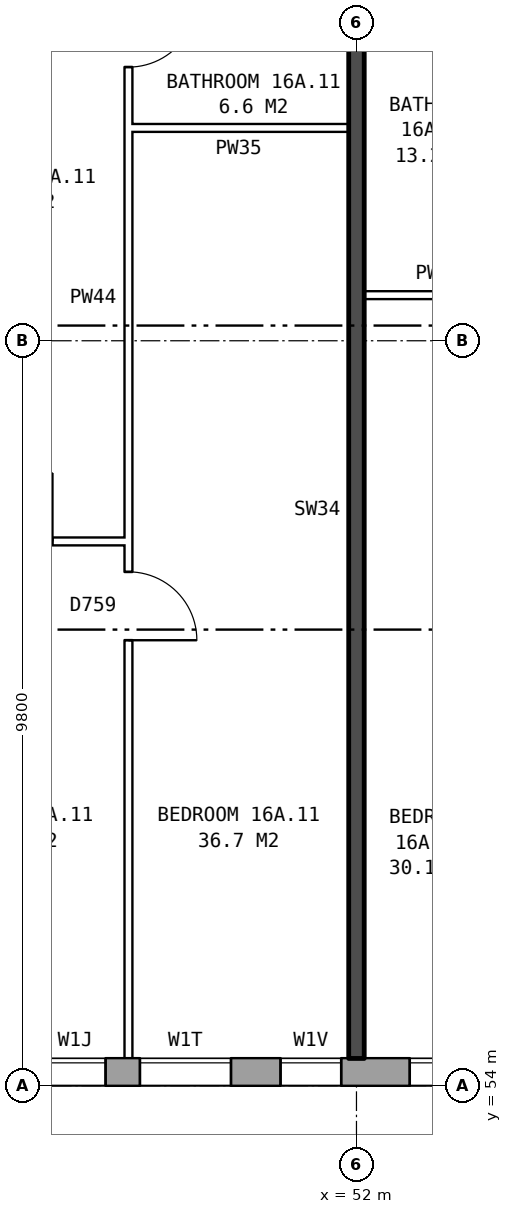
"""IFC4 building model, lengths in metres.
Left out: names, types, materials, properties, quantities, classifications, styles, units other than length and angle.
Written with IfcOpenShell. Run it as: python <this file> out.ifc"""

import sys

from ifc_helpers import new_model, si_unit, direction, frame, frame_2d, origin, place, context, subcontext, project, spatial, rectangle, extrude, element, fill, save


model = new_model("IFC4")
c1 = context("Model", 3, precision=1e-05, world=origin(), true_north=direction((0.0, 1.0)))
c2 = subcontext(c1, "Body", "Model", "MODEL_VIEW")
j1 = project(units=[si_unit("LENGTHUNIT", "METRE"), si_unit("PLANEANGLEUNIT", "RADIAN")], contexts=[c1])
p1 = place(None, origin())
s1 = spatial("IfcSite", under=j1, at=p1, CompositionType="ELEMENT")
p2 = place(p1, origin())
s2 = spatial("IfcBuilding", under=s1, at=p2, CompositionType="ELEMENT")
p3 = place(p2, frame((0.0, 0.0, 59.8)))
s3 = spatial("IfcBuildingStorey", under=s2, at=p3, CompositionType="ELEMENT", Elevation=59.8)
p4 = place(p3, frame((24.575, 54.18, 0.0), z_axis=(0.0, 0.0, 1.0), x_axis=(1.0, 0.0, 0.0)))
e1 = element("IfcWall", 1, at=p4, inside=s3, PredefinedType="STANDARD", context=c2, shape_type="SweptSolid", body=[
    extrude(rectangle(XDim=48.351, YDim=0.36, at=frame_2d((24.175, 0.0))), origin(), (0.0, 0.0, 1.0), 2.85),
])
p5 = place(p4, frame((1.125, 0.0, 0.8)))
e2 = element("IfcOpeningElement", 2, at=p5, cuts=e1, PredefinedType="OPENING", context=c2, shape_type="SweptSolid", body=[
    extrude(rectangle(XDim=1.6, YDim=1.8, at=frame_2d((0.8, 0.9))), frame((0.0, 0.19, 0.0), z_axis=(0.0, -1.0, 0.0), x_axis=(1.0, 0.0, 0.0)), (0.0, 0.0, 1.0), 0.38),
])
p6 = place(p4, frame((4.125, 0.0, 0.8)))
e3 = element("IfcOpeningElement", 3, at=p6, cuts=e1, PredefinedType="OPENING", context=c2, shape_type="SweptSolid", body=[
    extrude(rectangle(XDim=1.6, YDim=1.8, at=frame_2d((0.8, 0.9))), frame((0.0, 0.19, 0.0), z_axis=(0.0, -1.0, 0.0), x_axis=(1.0, 0.0, 0.0)), (0.0, 0.0, 1.0), 0.38),
])
p7 = place(p4, frame((7.125, 0.0, 0.8)))
e4 = element("IfcOpeningElement", 4, at=p7, cuts=e1, PredefinedType="OPENING", context=c2, shape_type="SweptSolid", body=[
    extrude(rectangle(XDim=1.6, YDim=1.8, at=frame_2d((0.8, 0.9))), frame((0.0, 0.19, 0.0), z_axis=(0.0, -1.0, 0.0), x_axis=(1.0, 0.0, 0.0)), (0.0, 0.0, 1.0), 0.38),
])
p8 = place(p4, frame((10.125, 0.0, 0.8)))
e5 = element("IfcOpeningElement", 5, at=p8, cuts=e1, PredefinedType="OPENING", context=c2, shape_type="SweptSolid", body=[
    extrude(rectangle(XDim=1.6, YDim=1.8, at=frame_2d((0.8, 0.9))), frame((0.0, 0.19, 0.0), z_axis=(0.0, -1.0, 0.0), x_axis=(1.0, 0.0, 0.0)), (0.0, 0.0, 1.0), 0.38),
])
p9 = place(p4, frame((13.125, 0.0, 0.8)))
e6 = element("IfcOpeningElement", 6, at=p9, cuts=e1, PredefinedType="OPENING", context=c2, shape_type="SweptSolid", body=[
    extrude(rectangle(XDim=1.6, YDim=1.8, at=frame_2d((0.8, 0.9))), frame((0.0, 0.19, 0.0), z_axis=(0.0, -1.0, 0.0), x_axis=(1.0, 0.0, 0.0)), (0.0, 0.0, 1.0), 0.38),
])
p10 = place(p4, frame((16.125, 0.0, 0.8)))
e7 = element("IfcOpeningElement", 7, at=p10, cuts=e1, PredefinedType="OPENING", context=c2, shape_type="SweptSolid", body=[
    extrude(rectangle(XDim=1.6, YDim=1.8, at=frame_2d((0.8, 0.9))), frame((0.0, 0.19, 0.0), z_axis=(0.0, -1.0, 0.0), x_axis=(1.0, 0.0, 0.0)), (0.0, 0.0, 1.0), 0.38),
])
p11 = place(p4, frame((19.125, 0.0, 0.8)))
e8 = element("IfcOpeningElement", 8, at=p11, cuts=e1, PredefinedType="OPENING", context=c2, shape_type="SweptSolid", body=[
    extrude(rectangle(XDim=1.6, YDim=1.8, at=frame_2d((0.8, 0.9))), frame((0.0, 0.19, 0.0), z_axis=(0.0, -1.0, 0.0), x_axis=(1.0, 0.0, 0.0)), (0.0, 0.0, 1.0), 0.38),
])
p12 = place(p4, frame((22.425, 0.0, 0.15)))
e9 = element("IfcOpeningElement", 9, at=p12, cuts=e1, PredefinedType="OPENING", context=c2, shape_type="SweptSolid", body=[
    extrude(rectangle(XDim=0.6, YDim=0.9, at=frame_2d((0.3, 0.45))), frame((0.0, 0.19, 0.0), z_axis=(0.0, -1.0, 0.0), x_axis=(1.0, 0.0, 0.0)), (0.0, 0.0, 1.0), 0.38),
])
p13 = place(p4, frame((24.575, 0.0, 0.25)))
e10 = element("IfcOpeningElement", 10, at=p13, cuts=e1, PredefinedType="OPENING", context=c2, shape_type="SweptSolid", body=[
    extrude(rectangle(XDim=1.2, YDim=0.9, at=frame_2d((0.6, 0.45))), frame((0.0, 0.19, 0.0), z_axis=(0.0, -1.0, 0.0), x_axis=(1.0, 0.0, 0.0)), (0.0, 0.0, 1.0), 0.38),
])
p14 = place(p4, frame((28.125, 0.0, 0.8)))
e11 = element("IfcOpeningElement", 11, at=p14, cuts=e1, PredefinedType="OPENING", context=c2, shape_type="SweptSolid", body=[
    extrude(rectangle(XDim=1.6, YDim=1.8, at=frame_2d((0.8, 0.9))), frame((0.0, 0.19, 0.0), z_axis=(0.0, -1.0, 0.0), x_axis=(1.0, 0.0, 0.0)), (0.0, 0.0, 1.0), 0.38),
])
p15 = place(p4, frame((31.125, 0.0, 0.8)))
e12 = element("IfcOpeningElement", 12, at=p15, cuts=e1, PredefinedType="OPENING", context=c2, shape_type="SweptSolid", body=[
    extrude(rectangle(XDim=1.6, YDim=1.8, at=frame_2d((0.8, 0.9))), frame((0.0, 0.19, 0.0), z_axis=(0.0, -1.0, 0.0), x_axis=(1.0, 0.0, 0.0)), (0.0, 0.0, 1.0), 0.38),
])
p16 = place(p4, frame((34.125, 0.0, 0.8)))
e13 = element("IfcOpeningElement", 13, at=p16, cuts=e1, PredefinedType="OPENING", context=c2, shape_type="SweptSolid", body=[
    extrude(rectangle(XDim=1.6, YDim=1.8, at=frame_2d((0.8, 0.9))), frame((0.0, 0.19, 0.0), z_axis=(0.0, -1.0, 0.0), x_axis=(1.0, 0.0, 0.0)), (0.0, 0.0, 1.0), 0.38),
])
p17 = place(p4, frame((37.125, 0.0, 0.8)))
e14 = element("IfcOpeningElement", 14, at=p17, cuts=e1, PredefinedType="OPENING", context=c2, shape_type="SweptSolid", body=[
    extrude(rectangle(XDim=1.6, YDim=1.8, at=frame_2d((0.8, 0.9))), frame((0.0, 0.19, 0.0), z_axis=(0.0, -1.0, 0.0), x_axis=(1.0, 0.0, 0.0)), (0.0, 0.0, 1.0), 0.38),
])
p18 = place(p4, frame((40.125, 0.0, 0.8)))
e15 = element("IfcOpeningElement", 15, at=p18, cuts=e1, PredefinedType="OPENING", context=c2, shape_type="SweptSolid", body=[
    extrude(rectangle(XDim=1.6, YDim=1.8, at=frame_2d((0.8, 0.9))), frame((0.0, 0.19, 0.0), z_axis=(0.0, -1.0, 0.0), x_axis=(1.0, 0.0, 0.0)), (0.0, 0.0, 1.0), 0.38),
])
p19 = place(p4, frame((43.125, 0.0, 0.8)))
e16 = element("IfcOpeningElement", 16, at=p19, cuts=e1, PredefinedType="OPENING", context=c2, shape_type="SweptSolid", body=[
    extrude(rectangle(XDim=1.6, YDim=1.8, at=frame_2d((0.8, 0.9))), frame((0.0, 0.19, 0.0), z_axis=(0.0, -1.0, 0.0), x_axis=(1.0, 0.0, 0.0)), (0.0, 0.0, 1.0), 0.38),
])
p20 = place(p4, frame((46.125, 0.0, 0.8)))
e17 = element("IfcOpeningElement", 17, at=p20, cuts=e1, PredefinedType="OPENING", context=c2, shape_type="SweptSolid", body=[
    extrude(rectangle(XDim=1.6, YDim=1.8, at=frame_2d((0.8, 0.9))), frame((0.0, 0.19, 0.0), z_axis=(0.0, -1.0, 0.0), x_axis=(1.0, 0.0, 0.0)), (0.0, 0.0, 1.0), 0.38),
])
p21 = place(p4, frame((23.325, 0.0, 0.15)))
e18 = element("IfcOpeningElement", 18, at=p21, cuts=e1, PredefinedType="OPENING", context=c2, shape_type="SweptSolid", body=[
    extrude(rectangle(XDim=0.8, YDim=1.5, at=frame_2d((0.4, 0.75))), frame((0.0, 0.19, 0.0), z_axis=(0.0, -1.0, 0.0), x_axis=(1.0, 0.0, 0.0)), (0.0, 0.0, 1.0), 0.38),
])
p22 = place(p4, frame((26.425, 0.0, 1.65)))
e19 = element("IfcOpeningElement", 19, at=p22, cuts=e1, PredefinedType="OPENING", context=c2, shape_type="SweptSolid", body=[
    extrude(rectangle(XDim=0.8, YDim=0.9, at=frame_2d((0.4, 0.45))), frame((0.0, 0.19, 0.0), z_axis=(0.0, -1.0, 0.0), x_axis=(1.0, 0.0, 0.0)), (0.0, 0.0, 1.0), 0.38),
])
p23 = place(p3, frame((46.1, 61.16, 0.0), z_axis=(0.0, 0.0, 1.0), x_axis=(1.0, 0.0, 0.0)))
e20 = element("IfcWall", 20, at=p23, inside=s3, PredefinedType="PARTITIONING", context=c2, shape_type="SweptSolid", body=[
    extrude(rectangle(XDim=2.9, YDim=0.1, at=frame_2d((1.45, 0.0))), origin(), (0.0, 0.0, 1.0), 2.85),
])
p24 = place(p23, frame((1.0, 0.0, 0.0)))
e21 = element("IfcOpeningElement", 21, at=p24, cuts=e20, PredefinedType="OPENING", context=c2, shape_type="SweptSolid", body=[
    extrude(rectangle(XDim=0.9, YDim=2.1, at=frame_2d((0.45, 1.05))), frame((0.0, 0.06, 0.0), z_axis=(0.0, -1.0, 0.0), x_axis=(1.0, 0.0, 0.0)), (0.0, 0.0, 1.0), 0.12),
])
for number, where, z_axis, x_axis in (
    (22, (52.1, 64.4, 0.0), (0.0, 0.0, 1.0), (1.0, 0.0, 0.0)),
    (23, (49.0, 66.6, 0.0), (0.0, 0.0, 1.0), (1.0, 0.0, 0.0)),
):
    element("IfcWall", number, at=place(p3, frame(where, z_axis=z_axis, x_axis=x_axis)), inside=s3, PredefinedType="PARTITIONING", context=c2, shape_type="SweptSolid", body=[
        extrude(rectangle(XDim=2.9, YDim=0.1, at=frame_2d((1.45, 0.0))), origin(), (0.0, 0.0, 1.0), 2.85),
    ])
p25 = place(p3, frame((49.0, 54.36, 0.0), z_axis=(0.0, 0.0, 1.0), x_axis=(0.0, 1.0, 0.0)))
e24 = element("IfcWall", 24, at=p25, inside=s3, PredefinedType="PARTITIONING", context=c2, shape_type="SweptSolid", body=[
    extrude(rectangle(XDim=14.34, YDim=0.1, at=frame_2d((7.17, 0.0))), origin(), (0.0, 0.0, 1.0), 2.85),
])
p26 = place(p25, frame((5.5, 0.0, 0.0)))
e25 = element("IfcOpeningElement", 25, at=p26, cuts=e24, PredefinedType="OPENING", context=c2, shape_type="SweptSolid", body=[
    extrude(rectangle(XDim=0.9, YDim=2.1, at=frame_2d((0.45, 1.05))), frame((0.0, 0.06, 0.0), z_axis=(0.0, -1.0, 0.0), x_axis=(1.0, 0.0, 0.0)), (0.0, 0.0, 1.0), 0.12),
])
p27 = place(p25, frame((13.04, 0.0, 0.0)))
e26 = element("IfcOpeningElement", 26, at=p27, cuts=e24, PredefinedType="OPENING", context=c2, shape_type="SweptSolid", body=[
    extrude(rectangle(XDim=0.9, YDim=2.1, at=frame_2d((0.45, 1.05))), frame((0.0, 0.06, 0.0), z_axis=(0.0, -1.0, 0.0), x_axis=(1.0, 0.0, 0.0)), (0.0, 0.0, 1.0), 0.12),
])
p28 = place(p3, frame((52.0, 54.36, 0.0), z_axis=(0.0, 0.0, 1.0), x_axis=(0.0, 1.0, 0.0)))
e27 = element("IfcWall", 27, at=p28, inside=s3, PredefinedType="SOLIDWALL", context=c2, shape_type="SweptSolid", body=[
    extrude(rectangle(XDim=14.44, YDim=0.2, at=frame_2d((7.22, 0.0))), origin(), (0.0, 0.0, 1.0), 2.85),
])
p29 = place(p13, origin())
e28 = element("IfcWindow", 28, at=p29, inside=s3, PartitioningType="SINGLE_PANEL", PredefinedType="WINDOW", context=c2, shape_type="SweptSolid", body=[
    extrude(rectangle(XDim=1.2, YDim=0.9, at=frame_2d((0.6, 0.45))), frame((0.0, 0.15, 0.0), z_axis=(0.0, -1.0, 0.0), x_axis=(1.0, 0.0, 0.0)), (0.0, 0.0, 1.0), 0.06),
])
fill(e10, e28)
p30 = place(p14, origin())
e29 = element("IfcWindow", 29, at=p30, inside=s3, PartitioningType="SINGLE_PANEL", PredefinedType="WINDOW", context=c2, shape_type="SweptSolid", body=[
    extrude(rectangle(XDim=1.6, YDim=1.8, at=frame_2d((0.8, 0.9))), frame((0.0, 0.15, 0.0), z_axis=(0.0, -1.0, 0.0), x_axis=(1.0, 0.0, 0.0)), (0.0, 0.0, 1.0), 0.06),
])
fill(e11, e29)
p31 = place(p26, frame((0.9, 0.0, 0.0), z_axis=(0.0, 0.0, 1.0), x_axis=(-1.0, 0.0, 0.0)))
e30 = element("IfcDoor", 30, at=p31, inside=s3, OperationType="SINGLE_SWING_RIGHT", PredefinedType="DOOR", context=c2, shape_type="SweptSolid", body=[
    extrude(rectangle(XDim=0.9, YDim=2.1, at=frame_2d((0.45, 1.05))), frame((0.0, 0.025, 0.0), z_axis=(0.0, -1.0, 0.0), x_axis=(1.0, 0.0, 0.0)), (0.0, 0.0, 1.0), 0.05),
])
fill(e25, e30)
p32 = place(p27, frame((0.9, 0.0, 0.0), z_axis=(0.0, 0.0, 1.0), x_axis=(-1.0, 0.0, 0.0)))
e31 = element("IfcDoor", 31, at=p32, inside=s3, OperationType="SINGLE_SWING_LEFT", PredefinedType="DOOR", context=c2, shape_type="SweptSolid", body=[
    extrude(rectangle(XDim=0.9, YDim=2.1, at=frame_2d((0.45, 1.05))), frame((0.0, 0.025, 0.0), z_axis=(0.0, -1.0, 0.0), x_axis=(1.0, 0.0, 0.0)), (0.0, 0.0, 1.0), 0.05),
])
fill(e26, e31)
p33 = place(p21, origin())
e32 = element("IfcWindow", 32, at=p33, inside=s3, PartitioningType="SINGLE_PANEL", PredefinedType="WINDOW", context=c2, shape_type="SweptSolid", body=[
    extrude(rectangle(XDim=0.8, YDim=1.5, at=frame_2d((0.4, 0.75))), frame((0.0, 0.15, 0.0), z_axis=(0.0, -1.0, 0.0), x_axis=(1.0, 0.0, 0.0)), (0.0, 0.0, 1.0), 0.06),
])
fill(e18, e32)
p34 = place(p22, origin())
e33 = element("IfcWindow", 33, at=p34, inside=s3, PartitioningType="SINGLE_PANEL", PredefinedType="WINDOW", context=c2, shape_type="SweptSolid", body=[
    extrude(rectangle(XDim=0.8, YDim=0.9, at=frame_2d((0.4, 0.45))), frame((0.0, 0.15, 0.0), z_axis=(0.0, -1.0, 0.0), x_axis=(1.0, 0.0, 0.0)), (0.0, 0.0, 1.0), 0.06),
])
fill(e19, e33)
save(model, sys.argv[1])
